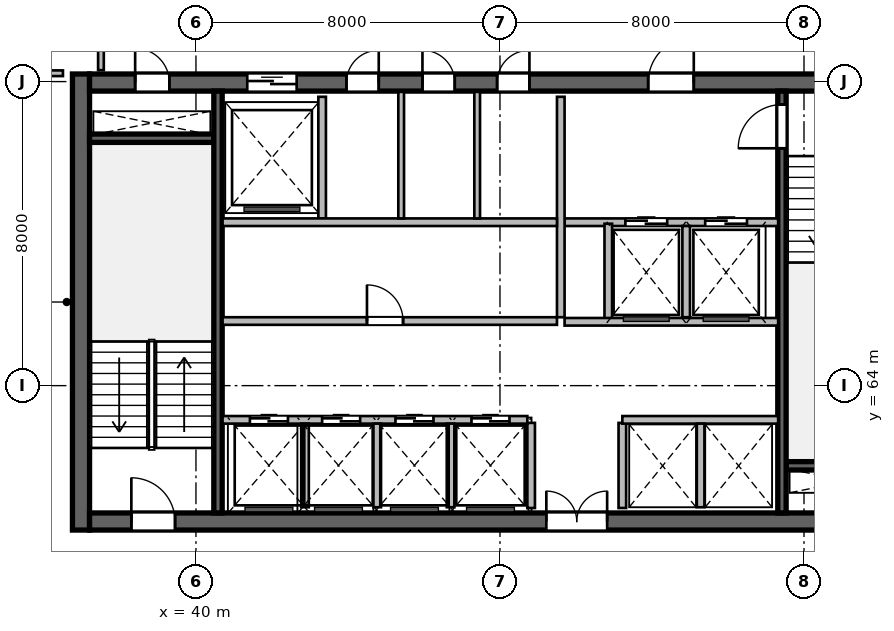
"""IFC4 building model, lengths in metres.
Left out: names, types, materials, properties, quantities, classifications, styles, units other than length and angle.
Written with IfcOpenShell. Run it as: python <this file> out.ifc"""

import sys

from ifc_helpers import new_model, si_unit, direction, frame, frame_2d, origin, place, context, subcontext, project, spatial, rectangle, extrude, source, transform, mapped, element, fill, save


model = new_model("IFC4")
c1 = context("Model", 3, precision=1e-05, world=origin(), true_north=direction((0.0, 1.0)))
c2 = subcontext(c1, "Body", "Model", "MODEL_VIEW")
j1 = project(units=[si_unit("LENGTHUNIT", "METRE"), si_unit("PLANEANGLEUNIT", "RADIAN")], contexts=[c1])
p1 = place(None, origin())
s1 = spatial("IfcSite", under=j1, at=p1, CompositionType="ELEMENT")
p2 = place(p1, origin())
s2 = spatial("IfcBuilding", under=s1, at=p2, CompositionType="ELEMENT")
p3 = place(p2, frame((0.0, 0.0, 207.9)))
s3 = spatial("IfcBuildingStorey", under=s2, at=p3, CompositionType="ELEMENT", Elevation=207.9)
m1 = source(origin(), c2, "Body", "SweptSolid", [
    extrude(rectangle(XDim=12.0, YDim=0.45, at=frame_2d((6.0, 0.0))), origin(), (0.0, 0.0, 1.0), 3.9),
])
p4 = place(p3, frame((36.975, 60.2, 0.0), z_axis=(0.0, 0.0, 1.0), x_axis=(0.0, 1.0, 0.0)))
e1 = element("IfcWall", 1, at=p4, inside=s3, PredefinedType="SHEAR", context=c2, shape_type="MappedRepresentation", body=[
    mapped(m1, transform((0.0, 0.0, 0.0), scale=1.0)),
])
m2 = source(origin(), c2, "Body", "SweptSolid", [
    extrude(rectangle(XDim=21.6, YDim=0.45, at=frame_2d((10.8, 0.0))), origin(), (0.0, 0.0, 1.0), 3.9),
])
p5 = place(p3, frame((37.2, 60.425, 0.0), z_axis=(0.0, 0.0, 1.0), x_axis=(1.0, 0.0, 0.0)))
e2 = element("IfcWall", 2, at=p5, inside=s3, PredefinedType="SHEAR", context=c2, shape_type="MappedRepresentation", body=[
    mapped(m2, transform((0.0, 0.0, 0.0), scale=1.0)),
])
p6 = place(p5, frame((1.1, 0.0, 0.0)))
e3 = element("IfcOpeningElement", 3, at=p6, cuts=e2, PredefinedType="OPENING", context=c2, shape_type="SweptSolid", body=[
    extrude(rectangle(XDim=1.15, YDim=2.15, at=frame_2d((0.575, 1.075))), frame((0.0, 0.235, 0.0), z_axis=(0.0, -1.0, 0.0), x_axis=(1.0, 0.0, 0.0)), (0.0, 0.0, 1.0), 0.47),
])
p7 = place(p5, frame((19.5, 0.0, 0.0)))
e4 = element("IfcOpeningElement", 4, at=p7, cuts=e2, PredefinedType="OPENING", context=c2, shape_type="SweptSolid", body=[
    extrude(rectangle(XDim=0.9, YDim=2.1, at=frame_2d((0.45, 1.05))), frame((0.0, 0.235, 0.0), z_axis=(0.0, -1.0, 0.0), x_axis=(1.0, 0.0, 0.0)), (0.0, 0.0, 1.0), 0.47),
])
p8 = place(p5, frame((12.02, 0.0, 0.0)))
e5 = element("IfcOpeningElement", 5, at=p8, cuts=e2, PredefinedType="OPENING", context=c2, shape_type="SweptSolid", body=[
    extrude(rectangle(XDim=1.6, YDim=2.15, at=frame_2d((0.8, 1.075))), frame((0.0, 0.235, 0.0), z_axis=(0.0, -1.0, 0.0), x_axis=(1.0, 0.0, 0.0)), (0.0, 0.0, 1.0), 0.47),
])
p9 = place(p3, frame((37.2, 71.975, 0.0), z_axis=(0.0, 0.0, 1.0), x_axis=(1.0, 0.0, 0.0)))
e6 = element("IfcWall", 6, at=p9, inside=s3, PredefinedType="SHEAR", context=c2, shape_type="MappedRepresentation", body=[
    mapped(m2, transform((0.0, 0.0, 0.0), scale=1.0)),
])
p10 = place(p9, frame((1.2, 0.0, 0.0)))
e7 = element("IfcOpeningElement", 7, at=p10, cuts=e6, PredefinedType="OPENING", context=c2, shape_type="SweptSolid", body=[
    extrude(rectangle(XDim=0.9, YDim=2.1, at=frame_2d((0.45, 1.05))), frame((0.0, 0.235, 0.0), z_axis=(0.0, -1.0, 0.0), x_axis=(1.0, 0.0, 0.0)), (0.0, 0.0, 1.0), 0.47),
])
p11 = place(p9, frame((14.7, 0.0, 0.0)))
e8 = element("IfcOpeningElement", 8, at=p11, cuts=e6, PredefinedType="OPENING", context=c2, shape_type="SweptSolid", body=[
    extrude(rectangle(XDim=1.2, YDim=2.15, at=frame_2d((0.6, 1.075))), frame((0.0, 0.235, 0.0), z_axis=(0.0, -1.0, 0.0), x_axis=(1.0, 0.0, 0.0)), (0.0, 0.0, 1.0), 0.47),
])
p12 = place(p9, frame((4.15, 0.0, 0.0)))
e9 = element("IfcOpeningElement", 9, at=p12, cuts=e6, PredefinedType="OPENING", context=c2, shape_type="SweptSolid", body=[
    extrude(rectangle(XDim=1.3, YDim=2.15, at=frame_2d((0.65, 1.075))), frame((0.0, 0.235, 0.0), z_axis=(0.0, -1.0, 0.0), x_axis=(1.0, 0.0, 0.0)), (0.0, 0.0, 1.0), 0.47),
])
p13 = place(p9, frame((6.76, 0.0, 0.0)))
e10 = element("IfcOpeningElement", 10, at=p13, cuts=e6, PredefinedType="OPENING", context=c2, shape_type="SweptSolid", body=[
    extrude(rectangle(XDim=0.85, YDim=2.1, at=frame_2d((0.425, 1.05))), frame((0.0, 0.235, 0.0), z_axis=(0.0, -1.0, 0.0), x_axis=(1.0, 0.0, 0.0)), (0.0, 0.0, 1.0), 0.47),
])
p14 = place(p9, frame((8.76, 0.0, 0.0)))
e11 = element("IfcOpeningElement", 11, at=p14, cuts=e6, PredefinedType="OPENING", context=c2, shape_type="SweptSolid", body=[
    extrude(rectangle(XDim=0.85, YDim=2.1, at=frame_2d((0.425, 1.05))), frame((0.0, 0.235, 0.0), z_axis=(0.0, -1.0, 0.0), x_axis=(1.0, 0.0, 0.0)), (0.0, 0.0, 1.0), 0.47),
])
p15 = place(p9, frame((10.725, 0.0, 0.0)))
e12 = element("IfcOpeningElement", 12, at=p15, cuts=e6, PredefinedType="OPENING", context=c2, shape_type="SweptSolid", body=[
    extrude(rectangle(XDim=0.85, YDim=2.1, at=frame_2d((0.425, 1.05))), frame((0.0, 0.235, 0.0), z_axis=(0.0, -1.0, 0.0), x_axis=(1.0, 0.0, 0.0)), (0.0, 0.0, 1.0), 0.47),
])
m3 = source(origin(), c2, "Body", "SweptSolid", [
    extrude(rectangle(XDim=3.27, YDim=0.22, at=frame_2d((1.635, 0.0))), origin(), (0.0, 0.0, 1.0), 3.9),
])
for number, where, z_axis, x_axis in (
    (13, (37.2, 70.51, 0.0), (0.0, 0.0, 1.0), (1.0, 0.0, 0.0)),
    (14, (55.53, 61.89, 0.0), (0.0, 0.0, 1.0), (1.0, 0.0, 0.0)),
):
    element("IfcWall", number, at=place(p3, frame(where, z_axis=z_axis, x_axis=x_axis)), inside=s3, PredefinedType="SHEAR", context=c2, shape_type="MappedRepresentation", body=[
        mapped(m3, transform((0.0, 0.0, 0.0), scale=1.0)),
    ])
m4 = source(origin(), c2, "Body", "SweptSolid", [
    extrude(rectangle(XDim=11.1, YDim=0.22, at=frame_2d((5.55, 0.0))), origin(), (0.0, 0.0, 1.0), 3.9),
])
p16 = place(p3, frame((40.58, 60.65, 0.0), z_axis=(0.0, 0.0, 1.0), x_axis=(0.0, 1.0, 0.0)))
e15 = element("IfcWall", 15, at=p16, inside=s3, PredefinedType="SHEAR", context=c2, shape_type="MappedRepresentation", body=[
    mapped(m4, transform((0.0, 0.0, 0.0), scale=1.0)),
])
p17 = place(p3, frame((55.42, 60.65, 0.0), z_axis=(0.0, 0.0, 1.0), x_axis=(0.0, 1.0, 0.0)))
e16 = element("IfcWall", 16, at=p17, inside=s3, PredefinedType="SHEAR", context=c2, shape_type="MappedRepresentation", body=[
    mapped(m4, transform((0.0, 0.0, 0.0), scale=1.0)),
])
p18 = place(p17, frame((9.595, 0.0, 0.0)))
e17 = element("IfcOpeningElement", 17, at=p18, cuts=e16, PredefinedType="OPENING", context=c2, shape_type="SweptSolid", body=[
    extrude(rectangle(XDim=1.15, YDim=2.15, at=frame_2d((0.575, 1.075))), frame((0.0, 0.12, 0.0), z_axis=(0.0, -1.0, 0.0), x_axis=(1.0, 0.0, 0.0)), (0.0, 0.0, 1.0), 0.24),
])
m5 = source(origin(), c2, "Body", "SweptSolid", [
    extrude(rectangle(XDim=2.24, YDim=0.2, at=frame_2d((1.12, 0.0))), origin(), (0.0, 0.0, 1.0), 3.64),
])
for number, where, z_axis, x_axis in (
    (18, (48.82, 60.78, 0.0), (0.0, 0.0, 1.0), (0.0, 1.0, 0.0)),
    (19, (51.22, 60.78, 0.0), (0.0, 0.0, 1.0), (0.0, 1.0, 0.0)),
):
    element("IfcWall", number, at=place(p3, frame(where, z_axis=z_axis, x_axis=x_axis)), inside=s3, PredefinedType="SOLIDWALL", context=c2, shape_type="MappedRepresentation", body=[
        mapped(m5, transform((0.0, 0.0, 0.0), scale=1.0)),
    ])
m6 = source(origin(), c2, "Body", "SweptSolid", [
    extrude(rectangle(XDim=5.62, YDim=0.2, at=frame_2d((2.81, 0.0))), origin(), (0.0, 0.0, 1.0), 3.64),
])
p19 = place(p3, frame((49.7, 68.3, 0.0), z_axis=(0.0, 0.0, 1.0), x_axis=(1.0, 0.0, 0.0)))
e20 = element("IfcWall", 20, at=p19, inside=s3, PredefinedType="SOLIDWALL", context=c2, shape_type="MappedRepresentation", body=[
    mapped(m6, transform((0.0, 0.0, 0.0), scale=1.0)),
])
p20 = place(p19, frame((1.6, 0.0, 0.0)))
e21 = element("IfcOpeningElement", 21, at=p20, cuts=e20, PredefinedType="OPENING", context=c2, shape_type="SweptSolid", body=[
    extrude(rectangle(XDim=1.1, YDim=2.15, at=frame_2d((0.55, 1.075))), frame((0.0, 0.11, 0.0), z_axis=(0.0, -1.0, 0.0), x_axis=(1.0, 0.0, 0.0)), (0.0, 0.0, 1.0), 0.22),
])
p21 = place(p19, frame((3.7, 0.0, 0.0)))
e22 = element("IfcOpeningElement", 22, at=p21, cuts=e20, PredefinedType="OPENING", context=c2, shape_type="SweptSolid", body=[
    extrude(rectangle(XDim=1.1, YDim=2.15, at=frame_2d((0.55, 1.075))), frame((0.0, 0.11, 0.0), z_axis=(0.0, -1.0, 0.0), x_axis=(1.0, 0.0, 0.0)), (0.0, 0.0, 1.0), 0.22),
])
m7 = source(origin(), c2, "Body", "SweptSolid", [
    extrude(rectangle(XDim=5.8, YDim=0.2, at=frame_2d((2.9, 0.0))), origin(), (0.0, 0.0, 1.0), 3.64),
])
p22 = place(p3, frame((49.6, 65.8, 0.0), z_axis=(0.0, 0.0, 1.0), x_axis=(0.0, 1.0, 0.0)))
e23 = element("IfcWall", 23, at=p22, inside=s3, PredefinedType="SOLIDWALL", context=c2, shape_type="MappedRepresentation", body=[
    mapped(m7, transform((0.0, 0.0, 0.0), scale=1.0)),
])
m8 = source(origin(), c2, "Body", "SweptSolid", [
    extrude(rectangle(XDim=2.58, YDim=0.2, at=frame_2d((1.29, 0.0))), origin(), (0.0, 0.0, 1.0), 3.64),
])
p23 = place(p3, frame((50.85, 65.68, 0.0), z_axis=(0.0, 0.0, 1.0), x_axis=(0.0, 1.0, 0.0)))
e24 = element("IfcWall", 24, at=p23, inside=s3, PredefinedType="SOLIDWALL", context=c2, shape_type="MappedRepresentation", body=[
    mapped(m8, transform((0.0, 0.0, 0.0), scale=1.0)),
])
m9 = source(origin(), c2, "Body", "SweptSolid", [
    extrude(rectangle(XDim=2.4, YDim=0.2, at=frame_2d((1.2, 0.0))), origin(), (0.0, 0.0, 1.0), 3.64),
])
p24 = place(p3, frame((52.9, 65.8, 0.0), z_axis=(0.0, 0.0, 1.0), x_axis=(0.0, 1.0, 0.0)))
e25 = element("IfcWall", 25, at=p24, inside=s3, PredefinedType="SOLIDWALL", context=c2, shape_type="MappedRepresentation", body=[
    mapped(m9, transform((0.0, 0.0, 0.0), scale=1.0)),
])
p25 = place(p3, frame((49.7, 65.68, 0.0), z_axis=(0.0, 0.0, 1.0), x_axis=(1.0, 0.0, 0.0)))
e26 = element("IfcWall", 26, at=p25, inside=s3, PredefinedType="SOLIDWALL", context=c2, shape_type="MappedRepresentation", body=[
    mapped(m6, transform((0.0, 0.0, 0.0), scale=1.0)),
])
m10 = source(origin(), c2, "Body", "SweptSolid", [
    extrude(rectangle(XDim=3.2, YDim=0.2, at=frame_2d((1.6, 0.0))), origin(), (0.0, 0.0, 1.0), 3.64),
])
p26 = place(p3, frame((43.32, 68.4, 0.0), z_axis=(0.0, 0.0, 1.0), x_axis=(0.0, 1.0, 0.0)))
e27 = element("IfcWall", 27, at=p26, inside=s3, PredefinedType="SOLIDWALL", context=c2, shape_type="MappedRepresentation", body=[
    mapped(m10, transform((0.0, 0.0, 0.0), scale=1.0)),
])
m11 = source(origin(), c2, "Body", "SweptSolid", [
    extrude(rectangle(XDim=8.8, YDim=0.2, at=frame_2d((4.4, 0.0))), origin(), (0.0, 0.0, 1.0), 3.64),
])
p27 = place(p3, frame((40.7, 68.3, 0.0), z_axis=(0.0, 0.0, 1.0), x_axis=(1.0, 0.0, 0.0)))
e28 = element("IfcWall", 28, at=p27, inside=s3, PredefinedType="SOLIDWALL", context=c2, shape_type="MappedRepresentation", body=[
    mapped(m11, transform((0.0, 0.0, 0.0), scale=1.0)),
])
m12 = source(origin(), c2, "Body", "SweptSolid", [
    extrude(rectangle(XDim=3.33, YDim=0.15, at=frame_2d((1.665, 0.0))), origin(), (0.0, 0.0, 1.0), 3.64),
])
for number, where, z_axis, x_axis in (
    (29, (45.4, 68.4, 0.0), (0.0, 0.0, 1.0), (0.0, 1.0, 0.0)),
    (30, (47.4, 68.4, 0.0), (0.0, 0.0, 1.0), (0.0, 1.0, 0.0)),
):
    element("IfcWall", number, at=place(p3, frame(where, z_axis=z_axis, x_axis=x_axis)), inside=s3, PredefinedType="PARTITIONING", context=c2, shape_type="MappedRepresentation", body=[
        mapped(m12, transform((0.0, 0.0, 0.0), scale=1.0)),
    ])
m13 = source(origin(), c2, "Body", "SweptSolid", [
    extrude(rectangle(XDim=8.02, YDim=0.2, at=frame_2d((4.01, 0.0))), origin(), (0.0, 0.0, 1.0), 3.64),
])
p28 = place(p3, frame((40.7, 63.1, 0.0), z_axis=(0.0, 0.0, 1.0), x_axis=(1.0, 0.0, 0.0)))
e31 = element("IfcWall", 31, at=p28, inside=s3, PredefinedType="SOLIDWALL", context=c2, shape_type="MappedRepresentation", body=[
    mapped(m13, transform((0.0, 0.0, 0.0), scale=1.0)),
])
p29 = place(p28, frame((0.72, 0.0, 0.0)))
e32 = element("IfcOpeningElement", 32, at=p29, cuts=e31, PredefinedType="OPENING", context=c2, shape_type="SweptSolid", body=[
    extrude(rectangle(XDim=1.0, YDim=2.15, at=frame_2d((0.5, 1.075))), frame((0.0, 0.11, 0.0), z_axis=(0.0, -1.0, 0.0), x_axis=(1.0, 0.0, 0.0)), (0.0, 0.0, 1.0), 0.22),
])
p30 = place(p28, frame((2.62, 0.0, 0.0)))
e33 = element("IfcOpeningElement", 33, at=p30, cuts=e31, PredefinedType="OPENING", context=c2, shape_type="SweptSolid", body=[
    extrude(rectangle(XDim=1.0, YDim=2.15, at=frame_2d((0.5, 1.075))), frame((0.0, 0.11, 0.0), z_axis=(0.0, -1.0, 0.0), x_axis=(1.0, 0.0, 0.0)), (0.0, 0.0, 1.0), 0.22),
])
p31 = place(p28, frame((4.55, 0.0, 0.0)))
e34 = element("IfcOpeningElement", 34, at=p31, cuts=e31, PredefinedType="OPENING", context=c2, shape_type="SweptSolid", body=[
    extrude(rectangle(XDim=1.0, YDim=2.15, at=frame_2d((0.5, 1.075))), frame((0.0, 0.11, 0.0), z_axis=(0.0, -1.0, 0.0), x_axis=(1.0, 0.0, 0.0)), (0.0, 0.0, 1.0), 0.22),
])
p32 = place(p28, frame((6.55, 0.0, 0.0)))
e35 = element("IfcOpeningElement", 35, at=p32, cuts=e31, PredefinedType="OPENING", context=c2, shape_type="SweptSolid", body=[
    extrude(rectangle(XDim=1.0, YDim=2.15, at=frame_2d((0.5, 1.075))), frame((0.0, 0.11, 0.0), z_axis=(0.0, -1.0, 0.0), x_axis=(1.0, 0.0, 0.0)), (0.0, 0.0, 1.0), 0.22),
])
m14 = source(origin(), c2, "Body", "SweptSolid", [
    extrude(rectangle(XDim=4.1, YDim=0.2, at=frame_2d((2.05, 0.0))), origin(), (0.0, 0.0, 1.0), 3.64),
])
p33 = place(p3, frame((51.22, 63.1, 0.0), z_axis=(0.0, 0.0, 1.0), x_axis=(1.0, 0.0, 0.0)))
e36 = element("IfcWall", 36, at=p33, inside=s3, PredefinedType="SOLIDWALL", context=c2, shape_type="MappedRepresentation", body=[
    mapped(m14, transform((0.0, 0.0, 0.0), scale=1.0)),
])
m15 = source(origin(), c2, "Body", "SweptSolid", [
    extrude(rectangle(XDim=2.2, YDim=0.2, at=frame_2d((1.1, 0.0))), origin(), (0.0, 0.0, 1.0), 3.64),
])
for number, where, z_axis, x_axis in (
    (37, (42.87, 60.8, 0.0), (0.0, 0.0, 1.0), (0.0, 1.0, 0.0)),
    (38, (44.77, 60.8, 0.0), (0.0, 0.0, 1.0), (0.0, 1.0, 0.0)),
    (39, (46.7, 60.8, 0.0), (0.0, 0.0, 1.0), (0.0, 1.0, 0.0)),
    (40, (53.28, 60.8, 0.0), (0.0, 0.0, 1.0), (0.0, 1.0, 0.0)),
):
    element("IfcWall", number, at=place(p3, frame(where, z_axis=z_axis, x_axis=x_axis)), inside=s3, PredefinedType="SOLIDWALL", context=c2, shape_type="MappedRepresentation", body=[
        mapped(m15, transform((0.0, 0.0, 0.0), scale=1.0)),
    ])
p34 = place(p3, frame((40.7, 65.7, 0.0), z_axis=(0.0, 0.0, 1.0), x_axis=(1.0, 0.0, 0.0)))
e41 = element("IfcWall", 41, at=p34, inside=s3, PredefinedType="SOLIDWALL", context=c2, shape_type="MappedRepresentation", body=[
    mapped(m11, transform((0.0, 0.0, 0.0), scale=1.0)),
])
p35 = place(p34, frame((3.8, 0.0, 0.0)))
e42 = element("IfcOpeningElement", 42, at=p35, cuts=e41, PredefinedType="OPENING", context=c2, shape_type="SweptSolid", body=[
    extrude(rectangle(XDim=0.95, YDim=2.15, at=frame_2d((0.475, 1.075))), frame((0.0, 0.11, 0.0), z_axis=(0.0, -1.0, 0.0), x_axis=(1.0, 0.0, 0.0)), (0.0, 0.0, 1.0), 0.22),
])
m16 = source(origin(), c2, "Body", "SweptSolid", [
    extrude(rectangle(XDim=2.1, YDim=0.15, at=frame_2d((1.05, 0.0))), origin(), (0.0, 0.0, 1.0), 3.64),
])
p36 = place(p3, frame((34.4, 72.22, 0.0), z_axis=(0.0, 0.0, 1.0), x_axis=(1.0, 0.0, 0.0)))
e43 = element("IfcWall", 43, at=p36, inside=s3, PredefinedType="PARTITIONING", context=c2, shape_type="MappedRepresentation", body=[
    mapped(m16, transform((0.0, 0.0, 0.0), scale=1.0)),
])
m17 = source(origin(), c2, "Body", "SweptSolid", [
    extrude(rectangle(XDim=1.982, YDim=0.15, at=frame_2d((0.991, 0.0))), origin(), (0.0, 0.0, 1.0), 3.64),
])
p37 = place(p3, frame((37.5, 72.3, 0.0), z_axis=(0.0, 0.0, 1.0), x_axis=(0.0, 1.0, 0.0)))
e44 = element("IfcWall", 44, at=p37, inside=s3, PredefinedType="PARTITIONING", context=c2, shape_type="MappedRepresentation", body=[
    mapped(m17, transform((0.0, 0.0, 0.0), scale=1.0)),
])
p38 = place(p37, frame((0.566, 0.0, 0.0)))
e45 = element("IfcOpeningElement", 45, at=p38, cuts=e44, PredefinedType="OPENING", context=c2, shape_type="SweptSolid", body=[
    extrude(rectangle(XDim=0.85, YDim=2.1, at=frame_2d((0.425, 1.05))), frame((0.0, 0.085, 0.0), z_axis=(0.0, -1.0, 0.0), x_axis=(1.0, 0.0, 0.0)), (0.0, 0.0, 1.0), 0.17),
])
m18 = source(origin(), c2, "Body", "SweptSolid", [
    extrude(rectangle(XDim=1.15, YDim=2.15, at=frame_2d((0.575, 1.075))), frame((0.0, 0.025, 0.0), z_axis=(0.0, -1.0, 0.0), x_axis=(1.0, 0.0, 0.0)), (0.0, 0.0, 1.0), 0.05),
])
p39 = place(p6, origin())
e46 = element("IfcDoor", 46, at=p39, inside=s3, OperationType="SINGLE_SWING_LEFT", PredefinedType="DOOR", context=c2, shape_type="MappedRepresentation", body=[
    mapped(m18, transform((0.0, 0.0, 0.0), scale=1.0)),
])
fill(e3, e46)
m19 = source(origin(), c2, "Body", "SweptSolid", [
    extrude(rectangle(XDim=0.9, YDim=2.1, at=frame_2d((0.45, 1.05))), frame((0.0, 0.025, 0.0), z_axis=(0.0, -1.0, 0.0), x_axis=(1.0, 0.0, 0.0)), (0.0, 0.0, 1.0), 0.05),
])
p40 = place(p10, origin())
e47 = element("IfcDoor", 47, at=p40, inside=s3, OperationType="SINGLE_SWING_LEFT", PredefinedType="DOOR", context=c2, shape_type="MappedRepresentation", body=[
    mapped(m19, transform((0.0, 0.0, 0.0), scale=1.0)),
])
fill(e7, e47)
p41 = place(p18, origin())
e48 = element("IfcDoor", 48, at=p41, inside=s3, OperationType="SINGLE_SWING_LEFT", PredefinedType="DOOR", context=c2, shape_type="MappedRepresentation", body=[
    mapped(m18, transform((0.0, 0.0, 0.0), scale=1.0)),
])
fill(e17, e48)
m20 = source(origin(), c2, "Body", "SweptSolid", [
    extrude(rectangle(XDim=1.6, YDim=2.15, at=frame_2d((0.8, 1.075))), frame((0.0, 0.025, 0.0), z_axis=(0.0, -1.0, 0.0), x_axis=(1.0, 0.0, 0.0)), (0.0, 0.0, 1.0), 0.05),
])
p42 = place(p8, origin())
e49 = element("IfcDoor", 49, at=p42, inside=s3, OperationType="DOUBLE_DOOR_SINGLE_SWING", PredefinedType="DOOR", context=c2, shape_type="MappedRepresentation", body=[
    mapped(m20, transform((0.0, 0.0, 0.0), scale=1.0)),
])
fill(e5, e49)
m21 = source(origin(), c2, "Body", "SweptSolid", [
    extrude(rectangle(XDim=1.2, YDim=2.15, at=frame_2d((0.6, 1.075))), frame((0.0, 0.025, 0.0), z_axis=(0.0, -1.0, 0.0), x_axis=(1.0, 0.0, 0.0)), (0.0, 0.0, 1.0), 0.05),
])
p43 = place(p11, origin())
e50 = element("IfcDoor", 50, at=p43, inside=s3, OperationType="SINGLE_SWING_RIGHT", PredefinedType="DOOR", context=c2, shape_type="MappedRepresentation", body=[
    mapped(m21, transform((0.0, 0.0, 0.0), scale=1.0)),
])
fill(e8, e50)
m22 = source(origin(), c2, "Body", "SweptSolid", [
    extrude(rectangle(XDim=1.1, YDim=2.15, at=frame_2d((0.55, 1.075))), frame((0.0, 0.025, 0.0), z_axis=(0.0, -1.0, 0.0), x_axis=(1.0, 0.0, 0.0)), (0.0, 0.0, 1.0), 0.05),
])
p44 = place(p20, origin())
e51 = element("IfcDoor", 51, at=p44, inside=s3, OperationType="DOUBLE_DOOR_SLIDING", PredefinedType="DOOR", context=c2, shape_type="MappedRepresentation", body=[
    mapped(m22, transform((0.0, 0.0, 0.0), scale=1.0)),
])
fill(e21, e51)
p45 = place(p21, origin())
e52 = element("IfcDoor", 52, at=p45, inside=s3, OperationType="DOUBLE_DOOR_SLIDING", PredefinedType="DOOR", context=c2, shape_type="MappedRepresentation", body=[
    mapped(m22, transform((0.0, 0.0, 0.0), scale=1.0)),
])
fill(e22, e52)
m23 = source(origin(), c2, "Body", "SweptSolid", [
    extrude(rectangle(XDim=1.3, YDim=2.15, at=frame_2d((0.65, 1.075))), frame((0.0, 0.025, 0.0), z_axis=(0.0, -1.0, 0.0), x_axis=(1.0, 0.0, 0.0)), (0.0, 0.0, 1.0), 0.05),
])
p46 = place(p12, origin())
e53 = element("IfcDoor", 53, at=p46, inside=s3, OperationType="DOUBLE_DOOR_SLIDING", PredefinedType="DOOR", context=c2, shape_type="MappedRepresentation", body=[
    mapped(m23, transform((0.0, 0.0, 0.0), scale=1.0)),
])
fill(e9, e53)
m24 = source(origin(), c2, "Body", "SweptSolid", [
    extrude(rectangle(XDim=0.85, YDim=2.1, at=frame_2d((0.425, 1.05))), frame((0.0, 0.025, 0.0), z_axis=(0.0, -1.0, 0.0), x_axis=(1.0, 0.0, 0.0)), (0.0, 0.0, 1.0), 0.05),
])
p47 = place(p13, origin())
e54 = element("IfcDoor", 54, at=p47, inside=s3, OperationType="SINGLE_SWING_RIGHT", PredefinedType="DOOR", context=c2, shape_type="MappedRepresentation", body=[
    mapped(m24, transform((0.0, 0.0, 0.0), scale=1.0)),
])
fill(e10, e54)
p48 = place(p14, origin())
e55 = element("IfcDoor", 55, at=p48, inside=s3, OperationType="SINGLE_SWING_LEFT", PredefinedType="DOOR", context=c2, shape_type="MappedRepresentation", body=[
    mapped(m24, transform((0.0, 0.0, 0.0), scale=1.0)),
])
fill(e11, e55)
p49 = place(p15, origin())
e56 = element("IfcDoor", 56, at=p49, inside=s3, OperationType="SINGLE_SWING_RIGHT", PredefinedType="DOOR", context=c2, shape_type="MappedRepresentation", body=[
    mapped(m24, transform((0.0, 0.0, 0.0), scale=1.0)),
])
fill(e12, e56)
m25 = source(origin(), c2, "Body", "SweptSolid", [
    extrude(rectangle(XDim=1.0, YDim=2.15, at=frame_2d((0.5, 1.075))), frame((0.0, 0.025, 0.0), z_axis=(0.0, -1.0, 0.0), x_axis=(1.0, 0.0, 0.0)), (0.0, 0.0, 1.0), 0.05),
])
p50 = place(p29, origin())
e57 = element("IfcDoor", 57, at=p50, inside=s3, OperationType="DOUBLE_DOOR_SLIDING", PredefinedType="DOOR", context=c2, shape_type="MappedRepresentation", body=[
    mapped(m25, transform((0.0, 0.0, 0.0), scale=1.0)),
])
fill(e32, e57)
p51 = place(p30, origin())
e58 = element("IfcDoor", 58, at=p51, inside=s3, OperationType="DOUBLE_DOOR_SLIDING", PredefinedType="DOOR", context=c2, shape_type="MappedRepresentation", body=[
    mapped(m25, transform((0.0, 0.0, 0.0), scale=1.0)),
])
fill(e33, e58)
p52 = place(p31, origin())
e59 = element("IfcDoor", 59, at=p52, inside=s3, OperationType="DOUBLE_DOOR_SLIDING", PredefinedType="DOOR", context=c2, shape_type="MappedRepresentation", body=[
    mapped(m25, transform((0.0, 0.0, 0.0), scale=1.0)),
])
fill(e34, e59)
p53 = place(p32, origin())
e60 = element("IfcDoor", 60, at=p53, inside=s3, OperationType="DOUBLE_DOOR_SLIDING", PredefinedType="DOOR", context=c2, shape_type="MappedRepresentation", body=[
    mapped(m25, transform((0.0, 0.0, 0.0), scale=1.0)),
])
fill(e35, e60)
m26 = source(origin(), c2, "Body", "SweptSolid", [
    extrude(rectangle(XDim=0.95, YDim=2.15, at=frame_2d((0.475, 1.075))), frame((0.0, 0.025, 0.0), z_axis=(0.0, -1.0, 0.0), x_axis=(1.0, 0.0, 0.0)), (0.0, 0.0, 1.0), 0.05),
])
p54 = place(p35, origin())
e61 = element("IfcDoor", 61, at=p54, inside=s3, OperationType="SINGLE_SWING_LEFT", PredefinedType="DOOR", context=c2, shape_type="MappedRepresentation", body=[
    mapped(m26, transform((0.0, 0.0, 0.0), scale=1.0)),
])
fill(e42, e61)
save(model, sys.argv[1])
